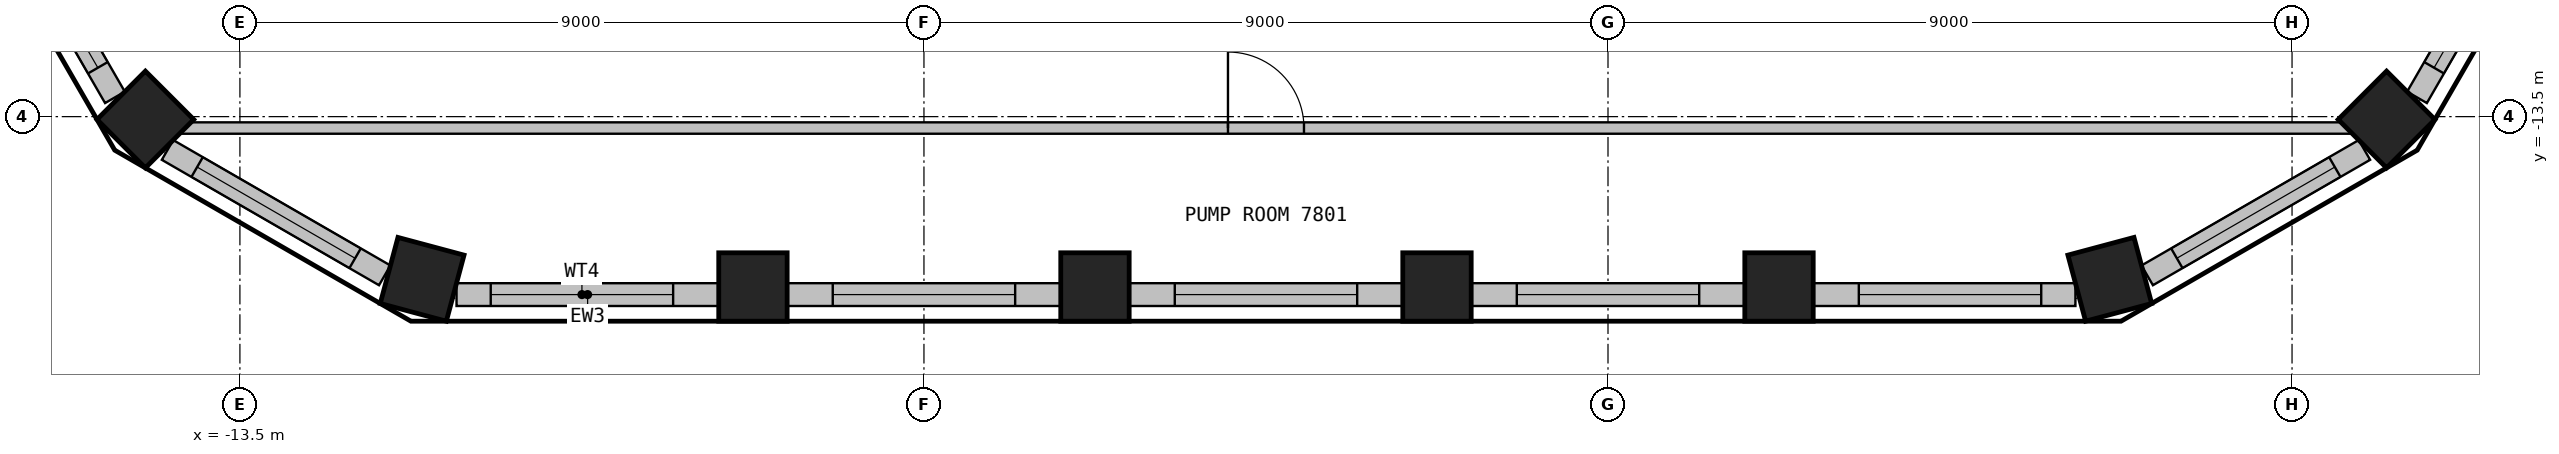
"""IFC4 building model, lengths in metres.
Left out: names, types, materials, properties, quantities, classifications, styles, units other than length and angle.
Written with IfcOpenShell. Run it as: python <this file> out.ifc"""

import sys

from ifc_helpers import new_model, si_unit, direction, frame, frame_2d, origin, origin_2d, place, context, subcontext, project, spatial, rectangle, extrude, element, fill, save


model = new_model("IFC4")
c1 = context("Model", 3, precision=1e-05, world=origin(), true_north=direction((0.0, 1.0)))
c2 = subcontext(c1, "Body", "Model", "MODEL_VIEW")
j1 = project(units=[si_unit("LENGTHUNIT", "METRE"), si_unit("PLANEANGLEUNIT", "RADIAN")], contexts=[c1])
p1 = place(None, origin())
s1 = spatial("IfcSite", under=j1, at=p1, CompositionType="ELEMENT")
p2 = place(p1, origin())
s2 = spatial("IfcBuilding", under=s1, at=p2, CompositionType="ELEMENT")
p3 = place(p2, frame((0.0, 0.0, 318.9)))
s3 = spatial("IfcBuildingStorey", under=s2, at=p3, CompositionType="ELEMENT", Elevation=318.9)
for number, where, z_axis, x_axis in (
    (1, (-11.102, -15.64, 0.0), (0.0, 0.0, 1.0), (0.966, -0.259, 0.0)),
    (2, (-6.75, -15.741, 0.0), (0.0, 0.0, 1.0), (1.0, 0.0, 0.0)),
    (3, (-2.25, -15.741, 0.0), (0.0, 0.0, 1.0), (1.0, 0.0, 0.0)),
    (4, (2.25, -15.741, 0.0), (0.0, 0.0, 1.0), (1.0, 0.0, 0.0)),
    (5, (6.75, -15.741, 0.0), (0.0, 0.0, 1.0), (1.0, 0.0, 0.0)),
    (6, (11.102, -15.64, 0.0), (0.0, 0.0, 1.0), (0.966, 0.259, 0.0)),
    (7, (14.744, -13.538, 0.0), (0.0, 0.0, 1.0), (0.707, 0.707, 0.0)),
    (8, (-14.744, -13.538, 0.0), (0.0, 0.0, 1.0), (0.707, -0.707, 0.0)),
):
    element("IfcColumn", number, at=place(p3, frame(where, z_axis=z_axis, x_axis=x_axis)), inside=s3, PredefinedType="COLUMN", context=c2, shape_type="SweptSolid", body=[
        extrude(rectangle(XDim=0.9, YDim=0.9, at=origin_2d()), origin(), (0.0, 0.0, 1.0), 3.6),
    ])
p4 = place(p3, frame((-10.65, -15.841, 0.0), z_axis=(0.0, 0.0, 1.0), x_axis=(1.0, 0.0, 0.0)))
e9 = element("IfcWall", 9, at=p4, inside=s3, PredefinedType="SOLIDWALL", context=c2, shape_type="SweptSolid", body=[
    extrude(rectangle(XDim=3.449, YDim=0.3, at=frame_2d((1.725, 0.0))), origin(), (0.0, 0.0, 1.0), 4.05),
])
p5 = place(p4, frame((0.45, 0.0, 0.6)))
e10 = element("IfcOpeningElement", 10, at=p5, cuts=e9, PredefinedType="OPENING", context=c2, shape_type="SweptSolid", body=[
    extrude(rectangle(XDim=2.4, YDim=2.3, at=frame_2d((1.2, 1.15))), frame((0.0, 0.16, 0.0), z_axis=(0.0, -1.0, 0.0), x_axis=(1.0, 0.0, 0.0)), (0.0, 0.0, 1.0), 0.32),
])
p6 = place(p3, frame((-6.3, -15.841, 0.0), z_axis=(0.0, 0.0, 1.0), x_axis=(1.0, 0.0, 0.0)))
e11 = element("IfcWall", 11, at=p6, inside=s3, PredefinedType="SOLIDWALL", context=c2, shape_type="SweptSolid", body=[
    extrude(rectangle(XDim=3.599, YDim=0.3, at=frame_2d((1.8, 0.0))), origin(), (0.0, 0.0, 1.0), 4.05),
])
p7 = place(p6, frame((0.6, 0.0, 0.6)))
e12 = element("IfcOpeningElement", 12, at=p7, cuts=e11, PredefinedType="OPENING", context=c2, shape_type="SweptSolid", body=[
    extrude(rectangle(XDim=2.4, YDim=2.3, at=frame_2d((1.2, 1.15))), frame((0.0, 0.16, 0.0), z_axis=(0.0, -1.0, 0.0), x_axis=(1.0, 0.0, 0.0)), (0.0, 0.0, 1.0), 0.32),
])
p8 = place(p3, frame((-1.8, -15.841, 0.0), z_axis=(0.0, 0.0, 1.0), x_axis=(1.0, 0.0, 0.0)))
e13 = element("IfcWall", 13, at=p8, inside=s3, PredefinedType="SOLIDWALL", context=c2, shape_type="SweptSolid", body=[
    extrude(rectangle(XDim=3.599, YDim=0.3, at=frame_2d((1.8, 0.0))), origin(), (0.0, 0.0, 1.0), 4.05),
])
p9 = place(p8, frame((0.6, 0.0, 0.6)))
e14 = element("IfcOpeningElement", 14, at=p9, cuts=e13, PredefinedType="OPENING", context=c2, shape_type="SweptSolid", body=[
    extrude(rectangle(XDim=2.4, YDim=2.3, at=frame_2d((1.2, 1.15))), frame((0.0, 0.16, 0.0), z_axis=(0.0, -1.0, 0.0), x_axis=(1.0, 0.0, 0.0)), (0.0, 0.0, 1.0), 0.32),
])
p10 = place(p3, frame((2.7, -15.841, 0.0), z_axis=(0.0, 0.0, 1.0), x_axis=(1.0, 0.0, 0.0)))
e15 = element("IfcWall", 15, at=p10, inside=s3, PredefinedType="SOLIDWALL", context=c2, shape_type="SweptSolid", body=[
    extrude(rectangle(XDim=3.599, YDim=0.3, at=frame_2d((1.8, 0.0))), origin(), (0.0, 0.0, 1.0), 4.05),
])
p11 = place(p10, frame((0.6, 0.0, 0.6)))
e16 = element("IfcOpeningElement", 16, at=p11, cuts=e15, PredefinedType="OPENING", context=c2, shape_type="SweptSolid", body=[
    extrude(rectangle(XDim=2.4, YDim=2.3, at=frame_2d((1.2, 1.15))), frame((0.0, 0.16, 0.0), z_axis=(0.0, -1.0, 0.0), x_axis=(1.0, 0.0, 0.0)), (0.0, 0.0, 1.0), 0.32),
])
p12 = place(p3, frame((7.2, -15.841, 0.0), z_axis=(0.0, 0.0, 1.0), x_axis=(1.0, 0.0, 0.0)))
e17 = element("IfcWall", 17, at=p12, inside=s3, PredefinedType="SOLIDWALL", context=c2, shape_type="SweptSolid", body=[
    extrude(rectangle(XDim=3.449, YDim=0.3, at=frame_2d((1.725, 0.0))), origin(), (0.0, 0.0, 1.0), 4.05),
])
p13 = place(p12, frame((0.6, 0.0, 0.6)))
e18 = element("IfcOpeningElement", 18, at=p13, cuts=e17, PredefinedType="OPENING", context=c2, shape_type="SweptSolid", body=[
    extrude(rectangle(XDim=2.4, YDim=2.3, at=frame_2d((1.2, 1.15))), frame((0.0, 0.16, 0.0), z_axis=(0.0, -1.0, 0.0), x_axis=(1.0, 0.0, 0.0)), (0.0, 0.0, 1.0), 0.32),
])
p14 = place(p3, frame((11.595, -15.588, 0.0), z_axis=(0.0, 0.0, 1.0), x_axis=(0.866021716278, 0.500006386895, 0.0)))
e19 = element("IfcWall", 19, at=p14, inside=s3, PredefinedType="SOLIDWALL", context=c2, shape_type="SweptSolid", body=[
    extrude(rectangle(XDim=3.3, YDim=0.3, at=frame_2d((1.65, 0.0))), origin(), (0.0, 0.0, 1.0), 4.05),
])
p15 = place(p14, frame((0.45, 0.0, 0.6)))
e20 = element("IfcOpeningElement", 20, at=p15, cuts=e19, PredefinedType="OPENING", context=c2, shape_type="SweptSolid", body=[
    extrude(rectangle(XDim=2.4, YDim=2.3, at=frame_2d((1.2, 1.15))), frame((0.0, 0.16, 0.0), z_axis=(0.0, -1.0, 0.0), x_axis=(1.0, 0.0, 0.0)), (0.0, 0.0, 1.0), 0.32),
])
p16 = place(p3, frame((15.144, -13.247, 0.0), z_axis=(0.0, 0.0, 1.0), x_axis=(0.500059425018, 0.865991092016, 0.0)))
e21 = element("IfcWall", 21, at=p16, inside=s3, PredefinedType="SOLIDWALL", context=c2, shape_type="SweptSolid", body=[
    extrude(rectangle(XDim=3.449, YDim=0.3, at=frame_2d((1.725, 0.0))), origin(), (0.0, 0.0, 1.0), 4.05),
])
p17 = place(p16, frame((0.45, 0.0, 0.6)))
e22 = element("IfcOpeningElement", 22, at=p17, cuts=e21, PredefinedType="OPENING", context=c2, shape_type="SweptSolid", body=[
    extrude(rectangle(XDim=2.4, YDim=2.3, at=frame_2d((1.2, 1.15))), frame((0.0, 0.16, 0.0), z_axis=(0.0, -1.0, 0.0), x_axis=(1.0, 0.0, 0.0)), (0.0, 0.0, 1.0), 0.32),
])
p18 = place(p3, frame((-16.869, -10.26, 0.0), z_axis=(0.0, 0.0, 1.0), x_axis=(0.500059425018, -0.865991092016, 0.0)))
e23 = element("IfcWall", 23, at=p18, inside=s3, PredefinedType="SOLIDWALL", context=c2, shape_type="SweptSolid", body=[
    extrude(rectangle(XDim=3.449, YDim=0.3, at=frame_2d((1.725, 0.0))), origin(), (0.0, 0.0, 1.0), 4.05),
])
p19 = place(p18, frame((0.6, 0.0, 0.6)))
e24 = element("IfcOpeningElement", 24, at=p19, cuts=e23, PredefinedType="OPENING", context=c2, shape_type="SweptSolid", body=[
    extrude(rectangle(XDim=2.4, YDim=2.3, at=frame_2d((1.2, 1.15))), frame((0.0, 0.16, 0.0), z_axis=(0.0, -1.0, 0.0), x_axis=(1.0, 0.0, 0.0)), (0.0, 0.0, 1.0), 0.32),
])
p20 = place(p3, frame((-14.452, -13.938, 0.0), z_axis=(0.0, 0.0, 1.0), x_axis=(0.866021716278, -0.500006386895, 0.0)))
e25 = element("IfcWall", 25, at=p20, inside=s3, PredefinedType="SOLIDWALL", context=c2, shape_type="SweptSolid", body=[
    extrude(rectangle(XDim=3.3, YDim=0.3, at=frame_2d((1.65, 0.0))), origin(), (0.0, 0.0, 1.0), 4.05),
])
p21 = place(p20, frame((0.45, 0.0, 0.6)))
e26 = element("IfcOpeningElement", 26, at=p21, cuts=e25, PredefinedType="OPENING", context=c2, shape_type="SweptSolid", body=[
    extrude(rectangle(XDim=2.4, YDim=2.3, at=frame_2d((1.2, 1.15))), frame((0.0, 0.16, 0.0), z_axis=(0.0, -1.0, 0.0), x_axis=(1.0, 0.0, 0.0)), (0.0, 0.0, 1.0), 0.32),
])
p22 = place(p3, frame((-14.969, -13.65, 0.0), z_axis=(0.0, 0.0, 1.0), x_axis=(1.0, 0.0, 0.0)))
e27 = element("IfcWall", 27, at=p22, inside=s3, PredefinedType="PARTITIONING", context=c2, shape_type="SweptSolid", body=[
    extrude(rectangle(XDim=29.938, YDim=0.15, at=frame_2d((14.969, 0.0))), origin(), (0.0, 0.0, 1.0), 3.6),
])
p23 = place(p22, frame((14.469, 0.0, 0.0)))
e28 = element("IfcOpeningElement", 28, at=p23, cuts=e27, PredefinedType="OPENING", context=c2, shape_type="SweptSolid", body=[
    extrude(rectangle(XDim=1.0, YDim=2.1, at=frame_2d((0.5, 1.05))), frame((0.0, 0.085, 0.0), z_axis=(0.0, -1.0, 0.0), x_axis=(1.0, 0.0, 0.0)), (0.0, 0.0, 1.0), 0.17),
])
p24 = place(p5, origin())
e29 = element("IfcWindow", 29, at=p24, inside=s3, PartitioningType="SINGLE_PANEL", PredefinedType="WINDOW", context=c2, shape_type="SweptSolid", body=[
    extrude(rectangle(XDim=2.4, YDim=2.3, at=frame_2d((1.2, 1.15))), frame((0.0, 0.03, 0.0), z_axis=(0.0, -1.0, 0.0), x_axis=(1.0, 0.0, 0.0)), (0.0, 0.0, 1.0), 0.06),
])
fill(e10, e29)
p25 = place(p7, origin())
e30 = element("IfcWindow", 30, at=p25, inside=s3, PartitioningType="SINGLE_PANEL", PredefinedType="WINDOW", context=c2, shape_type="SweptSolid", body=[
    extrude(rectangle(XDim=2.4, YDim=2.3, at=frame_2d((1.2, 1.15))), frame((0.0, 0.03, 0.0), z_axis=(0.0, -1.0, 0.0), x_axis=(1.0, 0.0, 0.0)), (0.0, 0.0, 1.0), 0.06),
])
fill(e12, e30)
p26 = place(p9, origin())
e31 = element("IfcWindow", 31, at=p26, inside=s3, PartitioningType="SINGLE_PANEL", PredefinedType="WINDOW", context=c2, shape_type="SweptSolid", body=[
    extrude(rectangle(XDim=2.4, YDim=2.3, at=frame_2d((1.2, 1.15))), frame((0.0, 0.03, 0.0), z_axis=(0.0, -1.0, 0.0), x_axis=(1.0, 0.0, 0.0)), (0.0, 0.0, 1.0), 0.06),
])
fill(e14, e31)
p27 = place(p11, origin())
e32 = element("IfcWindow", 32, at=p27, inside=s3, PartitioningType="SINGLE_PANEL", PredefinedType="WINDOW", context=c2, shape_type="SweptSolid", body=[
    extrude(rectangle(XDim=2.4, YDim=2.3, at=frame_2d((1.2, 1.15))), frame((0.0, 0.03, 0.0), z_axis=(0.0, -1.0, 0.0), x_axis=(1.0, 0.0, 0.0)), (0.0, 0.0, 1.0), 0.06),
])
fill(e16, e32)
p28 = place(p13, origin())
e33 = element("IfcWindow", 33, at=p28, inside=s3, PartitioningType="SINGLE_PANEL", PredefinedType="WINDOW", context=c2, shape_type="SweptSolid", body=[
    extrude(rectangle(XDim=2.4, YDim=2.3, at=frame_2d((1.2, 1.15))), frame((0.0, 0.03, 0.0), z_axis=(0.0, -1.0, 0.0), x_axis=(1.0, 0.0, 0.0)), (0.0, 0.0, 1.0), 0.06),
])
fill(e18, e33)
p29 = place(p15, origin())
e34 = element("IfcWindow", 34, at=p29, inside=s3, PartitioningType="SINGLE_PANEL", PredefinedType="WINDOW", context=c2, shape_type="SweptSolid", body=[
    extrude(rectangle(XDim=2.4, YDim=2.3, at=frame_2d((1.2, 1.15))), frame((0.0, 0.03, 0.0), z_axis=(0.0, -1.0, 0.0), x_axis=(1.0, 0.0, 0.0)), (0.0, 0.0, 1.0), 0.06),
])
fill(e20, e34)
p30 = place(p17, origin())
e35 = element("IfcWindow", 35, at=p30, inside=s3, PartitioningType="SINGLE_PANEL", PredefinedType="WINDOW", context=c2, shape_type="SweptSolid", body=[
    extrude(rectangle(XDim=2.4, YDim=2.3, at=frame_2d((1.2, 1.15))), frame((0.0, 0.03, 0.0), z_axis=(0.0, -1.0, 0.0), x_axis=(1.0, 0.0, 0.0)), (0.0, 0.0, 1.0), 0.06),
])
fill(e22, e35)
p31 = place(p19, origin())
e36 = element("IfcWindow", 36, at=p31, inside=s3, PartitioningType="SINGLE_PANEL", PredefinedType="WINDOW", context=c2, shape_type="SweptSolid", body=[
    extrude(rectangle(XDim=2.4, YDim=2.3, at=frame_2d((1.2, 1.15))), frame((0.0, 0.03, 0.0), z_axis=(0.0, -1.0, 0.0), x_axis=(1.0, 0.0, 0.0)), (0.0, 0.0, 1.0), 0.06),
])
fill(e24, e36)
p32 = place(p21, origin())
e37 = element("IfcWindow", 37, at=p32, inside=s3, PartitioningType="SINGLE_PANEL", PredefinedType="WINDOW", context=c2, shape_type="SweptSolid", body=[
    extrude(rectangle(XDim=2.4, YDim=2.3, at=frame_2d((1.2, 1.15))), frame((0.0, 0.03, 0.0), z_axis=(0.0, -1.0, 0.0), x_axis=(1.0, 0.0, 0.0)), (0.0, 0.0, 1.0), 0.06),
])
fill(e26, e37)
p33 = place(p23, origin())
e38 = element("IfcDoor", 38, at=p33, inside=s3, OperationType="SINGLE_SWING_LEFT", PredefinedType="DOOR", context=c2, shape_type="SweptSolid", body=[
    extrude(rectangle(XDim=1.0, YDim=2.1, at=frame_2d((0.5, 1.05))), frame((0.0, 0.025, 0.0), z_axis=(0.0, -1.0, 0.0), x_axis=(1.0, 0.0, 0.0)), (0.0, 0.0, 1.0), 0.05),
])
fill(e28, e38)
save(model, sys.argv[1])
